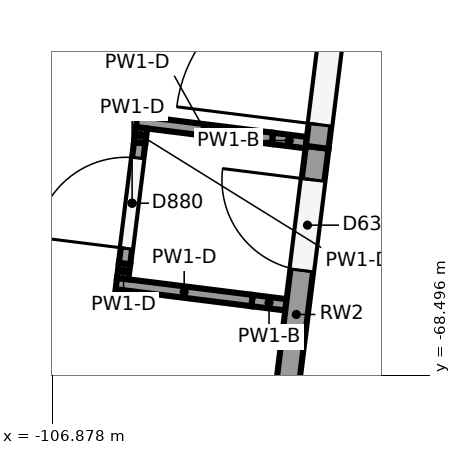
"""IFC4 building model, lengths in metres.
Left out: names, types, materials, properties, quantities, classifications, styles, units other than length and angle.
Written with IfcOpenShell. Run it as: python <this file> out.ifc"""

import sys

from ifc_helpers import new_model, si_unit, direction, frame, frame_2d, origin, place, context, subcontext, project, spatial, rectangle, extrude, element, fill, save


model = new_model("IFC4")
c1 = context("Model", 3, precision=1e-05, world=origin(), true_north=direction((0.0, 1.0)))
c2 = subcontext(c1, "Body", "Model", "MODEL_VIEW")
j1 = project(units=[si_unit("LENGTHUNIT", "METRE"), si_unit("PLANEANGLEUNIT", "RADIAN")], contexts=[c1])
p1 = place(None, origin())
s1 = spatial("IfcSite", under=j1, at=p1, CompositionType="ELEMENT")
p2 = place(p1, origin())
s2 = spatial("IfcBuilding", under=s1, at=p2, CompositionType="ELEMENT")
p3 = place(p2, origin())
s3 = spatial("IfcBuildingStorey", under=s2, at=p3, CompositionType="ELEMENT", Elevation=0.0)
p4 = place(p3, frame((-103.39, -65.497, 0.0), z_axis=(0.0, 0.0, 1.0), x_axis=(0.124123512645, 0.992266775423, 0.0)))
e1 = element("IfcWall", 1, at=p4, inside=s3, PredefinedType="SOLIDWALL", context=c2, shape_type="SweptSolid", body=[
    extrude(rectangle(XDim=4.4, YDim=0.3, at=frame_2d((2.2, 0.0))), origin(), (0.0, 0.0, 1.0), 4.85),
])
p5 = place(p4, frame((0.3, 0.0, 0.0)))
e2 = element("IfcOpeningElement", 2, at=p5, cuts=e1, PredefinedType="OPENING", context=c2, shape_type="SweptSolid", body=[
    extrude(rectangle(XDim=3.8, YDim=2.8, at=frame_2d((1.9, 1.4))), frame((0.0, 0.16, 0.0), z_axis=(0.0, -1.0, 0.0), x_axis=(1.0, 0.0, 0.0)), (0.0, 0.0, 1.0), 0.32),
])
p6 = place(p3, frame((-103.94, -69.895, 0.0), z_axis=(0.0, 0.0, 1.0), x_axis=(0.124116096768, 0.992267703054, 0.0)))
e3 = element("IfcWall", 3, at=p6, inside=s3, PredefinedType="SOLIDWALL", context=c2, shape_type="SweptSolid", body=[
    extrude(rectangle(XDim=4.432, YDim=0.3, at=frame_2d((2.216, 0.0))), origin(), (0.0, 0.0, 1.0), 4.85),
])
p7 = place(p6, frame((2.8, 0.0, 0.0)))
e4 = element("IfcOpeningElement", 4, at=p7, cuts=e3, PredefinedType="OPENING", context=c2, shape_type="SweptSolid", body=[
    extrude(rectangle(XDim=1.2, YDim=2.1, at=frame_2d((0.6, 1.05))), frame((0.0, 0.16, 0.0), z_axis=(0.0, -1.0, 0.0), x_axis=(1.0, 0.0, 0.0)), (0.0, 0.0, 1.0), 0.32),
])
p8 = place(p3, frame((-103.801, -67.569, 0.0), z_axis=(0.0, 0.0, 1.0), x_axis=(-0.992252817521, 0.124235043856, 0.0)))
e5 = element("IfcWall", 5, at=p8, inside=s3, PredefinedType="PARTITIONING", context=c2, shape_type="SweptSolid", body=[
    extrude(rectangle(XDim=0.45, YDim=0.15, at=frame_2d((0.225, 0.0))), origin(), (0.0, 0.0, 1.0), 4.85),
])
p9 = place(p3, frame((-104.247, -67.513, 0.0), z_axis=(0.0, 0.0, 1.0), x_axis=(-0.992269528002, 0.124101506031, 0.0)))
e6 = element("IfcWall", 6, at=p9, inside=s3, PredefinedType="PARTITIONING", context=c2, shape_type="SweptSolid", body=[
    extrude(rectangle(XDim=1.8, YDim=0.15, at=frame_2d((0.9, 0.0))), origin(), (0.0, 0.0, 1.0), 6.1),
])
p10 = place(p3, frame((-103.533, -65.436, 0.0), z_axis=(0.0, 0.0, 1.0), x_axis=(-0.992252817521, 0.124235043856, 0.0)))
e7 = element("IfcWall", 7, at=p10, inside=s3, PredefinedType="PARTITIONING", context=c2, shape_type="SweptSolid", body=[
    extrude(rectangle(XDim=0.45, YDim=0.15, at=frame_2d((0.225, 0.0))), origin(), (0.0, 0.0, 1.0), 4.85),
])
p11 = place(p3, frame((-103.98, -65.38, 0.0), z_axis=(0.0, 0.0, 1.0), x_axis=(-0.992269528002, 0.124101506031, 0.0)))
e8 = element("IfcWall", 8, at=p11, inside=s3, PredefinedType="PARTITIONING", context=c2, shape_type="SweptSolid", body=[
    extrude(rectangle(XDim=1.8, YDim=0.15, at=frame_2d((0.9, 0.0))), origin(), (0.0, 0.0, 1.0), 6.1),
])
p12 = place(p3, frame((-105.949, -67.225, 0.0), z_axis=(0.0, 0.0, 1.0), x_axis=(0.123283542659, 0.992371486949, 0.0)))
e9 = element("IfcWall", 9, at=p12, inside=s3, PredefinedType="PARTITIONING", context=c2, shape_type="SweptSolid", body=[
    extrude(rectangle(XDim=0.2, YDim=0.15, at=frame_2d((0.1, 0.0))), origin(), (0.0, 0.0, 1.0), 6.1),
])
p13 = place(p3, frame((-105.925, -67.026, 0.0), z_axis=(0.0, 0.0, 1.0), x_axis=(0.124203749421, 0.99225673524, 0.0)))
e10 = element("IfcWall", 10, at=p13, inside=s3, PredefinedType="PARTITIONING", context=c2, shape_type="SweptSolid", body=[
    extrude(rectangle(XDim=1.6, YDim=0.15, at=frame_2d((0.8, 0.0))), origin(), (0.0, 0.0, 1.0), 6.1),
])
p14 = place(p13, frame((0.2, 0.0, 0.0)))
e11 = element("IfcOpeningElement", 11, at=p14, cuts=e10, PredefinedType="OPENING", context=c2, shape_type="SweptSolid", body=[
    extrude(rectangle(XDim=1.2, YDim=2.1, at=frame_2d((0.6, 1.05))), frame((0.0, 0.085, 0.0), z_axis=(0.0, -1.0, 0.0), x_axis=(1.0, 0.0, 0.0)), (0.0, 0.0, 1.0), 0.17),
])
p15 = place(p3, frame((-105.726, -65.438, 0.0), z_axis=(0.0, 0.0, 1.0), x_axis=(0.124485347491, 0.99222144618, 0.0)))
e12 = element("IfcWall", 12, at=p15, inside=s3, PredefinedType="PARTITIONING", context=c2, shape_type="SweptSolid", body=[
    extrude(rectangle(XDim=0.2, YDim=0.15, at=frame_2d((0.1, 0.0))), origin(), (0.0, 0.0, 1.0), 6.1),
])
p16 = place(p5, origin())
e13 = element("IfcDoor", 13, at=p16, inside=s3, OperationType="DOUBLE_DOOR_SINGLE_SWING", PredefinedType="DOOR", context=c2, shape_type="SweptSolid", body=[
    extrude(rectangle(XDim=3.8, YDim=2.8, at=frame_2d((1.9, 1.4))), frame((0.0, 0.025, 0.0), z_axis=(0.0, -1.0, 0.0), x_axis=(1.0, 0.0, 0.0)), (0.0, 0.0, 1.0), 0.05),
])
fill(e2, e13)
p17 = place(p7, origin())
e14 = element("IfcDoor", 14, at=p17, inside=s3, OperationType="SINGLE_SWING_RIGHT", PredefinedType="DOOR", context=c2, shape_type="SweptSolid", body=[
    extrude(rectangle(XDim=1.2, YDim=2.1, at=frame_2d((0.6, 1.05))), frame((0.0, 0.025, 0.0), z_axis=(0.0, -1.0, 0.0), x_axis=(1.0, 0.0, 0.0)), (0.0, 0.0, 1.0), 0.05),
])
fill(e4, e14)
p18 = place(p14, origin())
e15 = element("IfcDoor", 15, at=p18, inside=s3, OperationType="SINGLE_SWING_LEFT", PredefinedType="DOOR", context=c2, shape_type="SweptSolid", body=[
    extrude(rectangle(XDim=1.2, YDim=2.1, at=frame_2d((0.6, 1.05))), frame((0.0, 0.025, 0.0), z_axis=(0.0, -1.0, 0.0), x_axis=(1.0, 0.0, 0.0)), (0.0, 0.0, 1.0), 0.05),
])
fill(e11, e15)
save(model, sys.argv[1])
